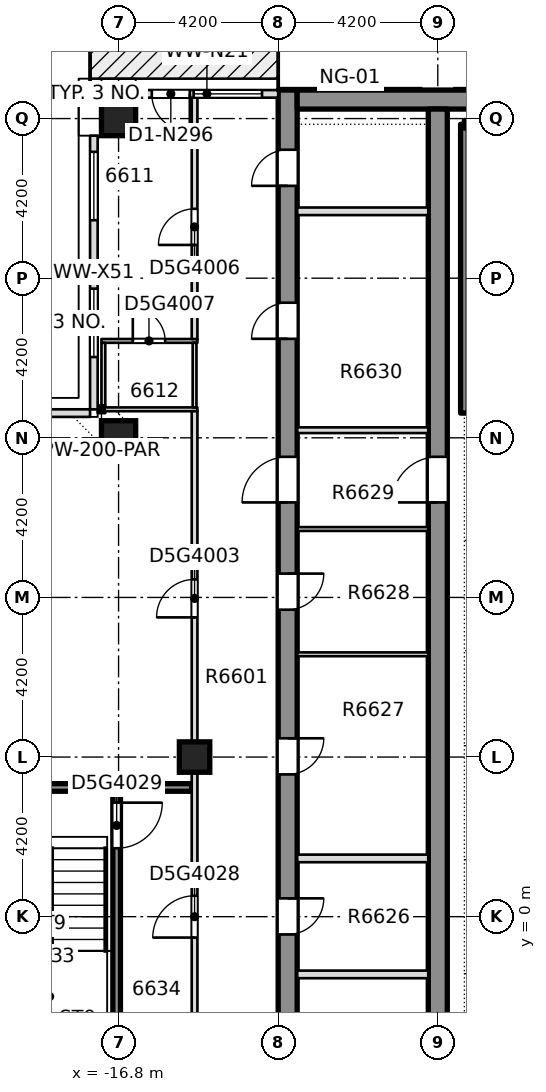
"""IFC4 building model, lengths in metres.
Left out: names, types, materials, properties, quantities, classifications, styles, units other than length and angle.
Written with IfcOpenShell. Run it as: python <this file> out.ifc"""

import sys

from ifc_helpers import new_model, si_unit, direction, frame, frame_2d, origin, origin_2d, place, context, subcontext, project, spatial, rectangle, extrude, element, fill, save


model = new_model("IFC4")
c1 = context("Model", 3, precision=1e-05, world=origin(), true_north=direction((0.0, 1.0)))
c2 = subcontext(c1, "Body", "Model", "MODEL_VIEW")
j1 = project(units=[si_unit("LENGTHUNIT", "METRE"), si_unit("PLANEANGLEUNIT", "RADIAN")], contexts=[c1])
p1 = place(None, origin())
s1 = spatial("IfcSite", under=j1, at=p1, CompositionType="ELEMENT")
p2 = place(p1, origin())
s2 = spatial("IfcBuilding", under=s1, at=p2, CompositionType="ELEMENT")
p3 = place(p2, frame((0.0, 0.0, 251.05)))
s3 = spatial("IfcBuildingStorey", under=s2, at=p3, CompositionType="ELEMENT", Elevation=251.05)
p4 = place(p3, frame((-12.35, -8.4, -0.4), z_axis=(0.0, 0.0, 1.0), x_axis=(0.0, 1.0, 0.0)))
e1 = element("IfcWall", 1, at=p4, inside=s3, PredefinedType="SHEAR", context=c2, shape_type="SweptSolid", body=[
    extrude(rectangle(XDim=30.15, YDim=0.5, at=frame_2d((15.075, 0.0))), origin(), (0.0, 0.0, 1.0), 3.45),
])
p5 = place(p4, frame((3.416, 0.0, 0.4)))
e2 = element("IfcOpeningElement", 2, at=p5, cuts=e1, PredefinedType="OPENING", context=c2, shape_type="SweptSolid", body=[
    extrude(rectangle(XDim=0.95, YDim=2.1, at=frame_2d((0.475, 1.05))), frame((0.0, 0.26, 0.0), z_axis=(0.0, -1.0, 0.0), x_axis=(1.0, 0.0, 0.0)), (0.0, 0.0, 1.0), 0.52),
])
p6 = place(p4, frame((7.932, 0.0, 0.4)))
e3 = element("IfcOpeningElement", 3, at=p6, cuts=e1, PredefinedType="OPENING", context=c2, shape_type="SweptSolid", body=[
    extrude(rectangle(XDim=0.95, YDim=2.1, at=frame_2d((0.475, 1.05))), frame((0.0, 0.26, 0.0), z_axis=(0.0, -1.0, 0.0), x_axis=(1.0, 0.0, 0.0)), (0.0, 0.0, 1.0), 0.52),
])
p7 = place(p4, frame((12.144, 0.0, 0.4)))
e4 = element("IfcOpeningElement", 4, at=p7, cuts=e1, PredefinedType="OPENING", context=c2, shape_type="SweptSolid", body=[
    extrude(rectangle(XDim=0.95, YDim=2.1, at=frame_2d((0.475, 1.05))), frame((0.0, 0.26, 0.0), z_axis=(0.0, -1.0, 0.0), x_axis=(1.0, 0.0, 0.0)), (0.0, 0.0, 1.0), 0.52),
])
p8 = place(p4, frame((16.477, 0.0, 0.4)))
e5 = element("IfcOpeningElement", 5, at=p8, cuts=e1, PredefinedType="OPENING", context=c2, shape_type="SweptSolid", body=[
    extrude(rectangle(XDim=0.95, YDim=2.1, at=frame_2d((0.475, 1.05))), frame((0.0, 0.26, 0.0), z_axis=(0.0, -1.0, 0.0), x_axis=(1.0, 0.0, 0.0)), (0.0, 0.0, 1.0), 0.52),
])
p9 = place(p4, frame((23.605, 0.0, 0.4)))
e6 = element("IfcOpeningElement", 6, at=p9, cuts=e1, PredefinedType="OPENING", context=c2, shape_type="SweptSolid", body=[
    extrude(rectangle(XDim=0.95, YDim=2.1, at=frame_2d((0.475, 1.05))), frame((0.0, 0.26, 0.0), z_axis=(0.0, -1.0, 0.0), x_axis=(1.0, 0.0, 0.0)), (0.0, 0.0, 1.0), 0.52),
])
p10 = place(p4, frame((27.63, 0.0, 0.4)))
e7 = element("IfcOpeningElement", 7, at=p10, cuts=e1, PredefinedType="OPENING", context=c2, shape_type="SweptSolid", body=[
    extrude(rectangle(XDim=0.95, YDim=2.1, at=frame_2d((0.475, 1.05))), frame((0.0, 0.26, 0.0), z_axis=(0.0, -1.0, 0.0), x_axis=(1.0, 0.0, 0.0)), (0.0, 0.0, 1.0), 0.52),
])
p11 = place(p4, frame((19.3, 0.0, 0.4)))
e8 = element("IfcOpeningElement", 8, at=p11, cuts=e1, PredefinedType="OPENING", context=c2, shape_type="SweptSolid", body=[
    extrude(rectangle(XDim=1.2, YDim=2.1, at=frame_2d((0.6, 1.05))), frame((0.0, 0.26, 0.0), z_axis=(0.0, -1.0, 0.0), x_axis=(1.0, 0.0, 0.0)), (0.0, 0.0, 1.0), 0.52),
])
p12 = place(p3, frame((-12.1, 21.5, -0.4), z_axis=(0.0, 0.0, 1.0), x_axis=(1.0, 0.0, 0.0)))
e9 = element("IfcWall", 9, at=p12, inside=s3, PredefinedType="SHEAR", context=c2, shape_type="SweptSolid", body=[
    extrude(rectangle(XDim=24.2, YDim=0.5, at=frame_2d((12.1, 0.0))), origin(), (0.0, 0.0, 1.0), 3.45),
])
p13 = place(p3, frame((-8.4, -7.9, -0.4), z_axis=(0.0, 0.0, 1.0), x_axis=(0.0, 1.0, 0.0)))
e10 = element("IfcWall", 10, at=p13, inside=s3, PredefinedType="SHEAR", context=c2, shape_type="SweptSolid", body=[
    extrude(rectangle(XDim=29.15, YDim=0.5, at=frame_2d((14.575, 0.0))), origin(), (0.0, 0.0, 1.0), 3.45),
])
p14 = place(p13, frame((18.8, 0.0, 0.4)))
e11 = element("IfcOpeningElement", 11, at=p14, cuts=e10, PredefinedType="OPENING", context=c2, shape_type="SweptSolid", body=[
    extrude(rectangle(XDim=1.2, YDim=2.1, at=frame_2d((0.6, 1.05))), frame((0.0, 0.26, 0.0), z_axis=(0.0, -1.0, 0.0), x_axis=(1.0, 0.0, 0.0)), (0.0, 0.0, 1.0), 0.52),
])
for number, where, z_axis, x_axis in (
    (12, (-16.8, 12.6, -0.4), (0.0, 0.0, 1.0), (1.0, 0.0, 0.0)),
    (13, (-16.8, 21.0, -0.4), (0.0, 0.0, 1.0), (1.0, 0.0, 0.0)),
):
    element("IfcColumn", number, at=place(p3, frame(where, z_axis=z_axis, x_axis=x_axis)), inside=s3, PredefinedType="COLUMN", context=c2, shape_type="SweptSolid", body=[
        extrude(rectangle(XDim=0.9, YDim=0.9, at=origin_2d()), origin(), (0.0, 0.0, 1.0), 3.45),
    ])
p15 = place(p3, frame((-14.8, 4.2, -0.4), z_axis=(0.0, 0.0, 1.0), x_axis=(1.0, 0.0, 0.0)))
e14 = element("IfcColumn", 14, at=p15, inside=s3, PredefinedType="COLUMN", context=c2, shape_type="SweptSolid", body=[
    extrude(rectangle(XDim=0.8, YDim=0.8, at=origin_2d()), origin(), (0.0, 0.0, 1.0), 3.45),
])
p16 = place(p3, frame((-20.45, 3.4, 0.0), z_axis=(0.0, 0.0, 1.0), x_axis=(1.0, 0.0, 0.0)))
e15 = element("IfcWall", 15, at=p16, inside=s3, PredefinedType="SOLIDWALL", context=c2, shape_type="SweptSolid", body=[
    extrude(rectangle(XDim=5.575, YDim=0.2, at=frame_2d((2.788, 0.0))), origin(), (0.0, 0.0, 1.0), 3.05),
])
p17 = place(p3, frame((-17.35, 13.35, 0.0), z_axis=(0.0, 0.0, 1.0), x_axis=(1.0, 0.0, 0.0)))
e16 = element("IfcWall", 16, at=p17, inside=s3, PredefinedType="PARTITIONING", context=c2, shape_type="SweptSolid", body=[
    extrude(rectangle(XDim=0.2, YDim=0.2, at=frame_2d((0.1, 0.0))), origin(), (0.0, 0.0, 1.0), 3.05),
])
p18 = place(p3, frame((-17.25, 13.35, 0.0), z_axis=(0.0, 0.0, 1.0), x_axis=(1.0, 0.0, 0.0)))
e17 = element("IfcWall", 17, at=p18, inside=s3, PredefinedType="PARTITIONING", context=c2, shape_type="SweptSolid", body=[
    extrude(rectangle(XDim=2.525, YDim=0.1, at=frame_2d((1.262, 0.0))), origin(), (0.0, 0.0, 1.0), 3.05),
])
p19 = place(p3, frame((-17.25, 15.15, 0.0), z_axis=(0.0, 0.0, 1.0), x_axis=(1.0, 0.0, 0.0)))
e18 = element("IfcWall", 18, at=p19, inside=s3, PredefinedType="PARTITIONING", context=c2, shape_type="SweptSolid", body=[
    extrude(rectangle(XDim=2.525, YDim=0.1, at=frame_2d((1.262, 0.0))), origin(), (0.0, 0.0, 1.0), 3.05),
])
p20 = place(p19, frame((0.825, 0.0, 0.0)))
e19 = element("IfcOpeningElement", 19, at=p20, cuts=e18, PredefinedType="OPENING", context=c2, shape_type="SweptSolid", body=[
    extrude(rectangle(XDim=0.85, YDim=2.1, at=frame_2d((0.425, 1.05))), frame((0.0, 0.06, 0.0), z_axis=(0.0, -1.0, 0.0), x_axis=(1.0, 0.0, 0.0)), (0.0, 0.0, 1.0), 0.12),
])
p21 = place(p3, frame((-17.2, 13.45, 0.0), z_axis=(0.0, 0.0, 1.0), x_axis=(0.0, 1.0, 0.0)))
e20 = element("IfcWall", 20, at=p21, inside=s3, PredefinedType="PARTITIONING", context=c2, shape_type="SweptSolid", body=[
    extrude(rectangle(XDim=1.65, YDim=0.1, at=frame_2d((0.825, 0.0))), origin(), (0.0, 0.0, 1.0), 3.05),
])
p22 = place(p3, frame((-16.85, -3.3, 0.0), z_axis=(0.0, 0.0, 1.0), x_axis=(0.0, 1.0, 0.0)))
e21 = element("IfcWall", 21, at=p22, inside=s3, PredefinedType="SOLIDWALL", context=c2, shape_type="SweptSolid", body=[
    extrude(rectangle(XDim=6.6, YDim=0.2, at=frame_2d((3.3, 0.0))), origin(), (0.0, 0.0, 1.0), 3.05),
])
p23 = place(p22, frame((5.1, 0.0, 0.0)))
e22 = element("IfcOpeningElement", 22, at=p23, cuts=e21, PredefinedType="OPENING", context=c2, shape_type="SweptSolid", body=[
    extrude(rectangle(XDim=1.2, YDim=2.1, at=frame_2d((0.6, 1.05))), frame((0.0, 0.11, 0.0), z_axis=(0.0, -1.0, 0.0), x_axis=(1.0, 0.0, 0.0)), (0.0, 0.0, 1.0), 0.22),
])
p24 = place(p3, frame((-14.8, -5.223, 0.0), z_axis=(0.0, 0.0, 1.0), x_axis=(0.0, 1.0, 0.0)))
e23 = element("IfcWall", 23, at=p24, inside=s3, PredefinedType="PARTITIONING", context=c2, shape_type="SweptSolid", body=[
    extrude(rectangle(XDim=18.523, YDim=0.15, at=frame_2d((9.261, 0.0))), origin(), (0.0, 0.0, 1.0), 3.05),
])
p25 = place(p24, frame((13.098, 0.0, 0.0)))
e24 = element("IfcOpeningElement", 24, at=p25, cuts=e23, PredefinedType="OPENING", context=c2, shape_type="SweptSolid", body=[
    extrude(rectangle(XDim=1.0, YDim=2.1, at=frame_2d((0.5, 1.05))), frame((0.0, 0.085, 0.0), z_axis=(0.0, -1.0, 0.0), x_axis=(1.0, 0.0, 0.0)), (0.0, 0.0, 1.0), 0.17),
])
p26 = place(p24, frame((4.673, 0.0, 0.0)))
e25 = element("IfcOpeningElement", 25, at=p26, cuts=e23, PredefinedType="OPENING", context=c2, shape_type="SweptSolid", body=[
    extrude(rectangle(XDim=1.1, YDim=2.1, at=frame_2d((0.55, 1.05))), frame((0.0, 0.085, 0.0), z_axis=(0.0, -1.0, 0.0), x_axis=(1.0, 0.0, 0.0)), (0.0, 0.0, 1.0), 0.17),
])
p27 = place(p3, frame((-14.8, 13.4, 0.0), z_axis=(0.0, 0.0, 1.0), x_axis=(0.0, 1.0, 0.0)))
e26 = element("IfcWall", 26, at=p27, inside=s3, PredefinedType="PARTITIONING", context=c2, shape_type="SweptSolid", body=[
    extrude(rectangle(XDim=1.7, YDim=0.1, at=frame_2d((0.85, 0.0))), origin(), (0.0, 0.0, 1.0), 3.05),
])
p28 = place(p3, frame((-14.8, 15.2, 0.0), z_axis=(0.0, 0.0, 1.0), x_axis=(0.0, 1.0, 0.0)))
e27 = element("IfcWall", 27, at=p28, inside=s3, PredefinedType="PARTITIONING", context=c2, shape_type="SweptSolid", body=[
    extrude(rectangle(XDim=6.35, YDim=0.15, at=frame_2d((3.175, 0.0))), origin(), (0.0, 0.0, 1.0), 3.05),
])
p29 = place(p28, frame((2.475, 0.0, 0.0)))
e28 = element("IfcOpeningElement", 28, at=p29, cuts=e27, PredefinedType="OPENING", context=c2, shape_type="SweptSolid", body=[
    extrude(rectangle(XDim=0.95, YDim=2.1, at=frame_2d((0.475, 1.05))), frame((0.0, 0.085, 0.0), z_axis=(0.0, -1.0, 0.0), x_axis=(1.0, 0.0, 0.0)), (0.0, 0.0, 1.0), 0.17),
])
p30 = place(p3, frame((-12.6, 21.65, 0.0), z_axis=(0.0, 0.0, 1.0), x_axis=(-1.0, 0.0, 0.0)))
e29 = element("IfcWall", 29, at=p30, inside=s3, PredefinedType="STANDARD", context=c2, shape_type="SweptSolid", body=[
    extrude(rectangle(XDim=3.75, YDim=0.2, at=frame_2d((1.875, 0.0))), origin(), (0.0, 0.0, 1.0), 3.05),
])
p31 = place(p30, frame((0.425, 0.0, 0.2)))
e30 = element("IfcOpeningElement", 30, at=p31, cuts=e29, PredefinedType="OPENING", context=c2, shape_type="SweptSolid", body=[
    extrude(rectangle(XDim=1.8, YDim=2.65, at=frame_2d((0.9, 1.325))), frame((0.0, 0.11, 0.0), z_axis=(0.0, -1.0, 0.0), x_axis=(1.0, 0.0, 0.0)), (0.0, 0.0, 1.0), 0.22),
])
p32 = place(p30, frame((2.325, 0.0, 0.0)))
e31 = element("IfcOpeningElement", 31, at=p32, cuts=e29, PredefinedType="OPENING", context=c2, shape_type="SweptSolid", body=[
    extrude(rectangle(XDim=1.0, YDim=2.4, at=frame_2d((0.5, 1.2))), frame((0.0, 0.11, 0.0), z_axis=(0.0, -1.0, 0.0), x_axis=(1.0, 0.0, 0.0)), (0.0, 0.0, 1.0), 0.22),
])
p33 = place(p3, frame((-17.45, 20.55, 0.0), z_axis=(0.0, 0.0, 1.0), x_axis=(0.0, -1.0, 0.0)))
e32 = element("IfcWall", 32, at=p33, inside=s3, PredefinedType="STANDARD", context=c2, shape_type="SweptSolid", body=[
    extrude(rectangle(XDim=7.2, YDim=0.2, at=frame_2d((3.6, 0.0))), origin(), (0.0, 0.0, 1.0), 3.05),
])
p34 = place(p33, frame((4.025, 0.0, 0.2)))
e33 = element("IfcOpeningElement", 33, at=p34, cuts=e32, PredefinedType="OPENING", context=c2, shape_type="SweptSolid", body=[
    extrude(rectangle(XDim=1.8, YDim=2.65, at=frame_2d((0.9, 1.325))), frame((0.0, 0.11, 0.0), z_axis=(0.0, -1.0, 0.0), x_axis=(1.0, 0.0, 0.0)), (0.0, 0.0, 1.0), 0.22),
])
p35 = place(p33, frame((0.425, 0.0, 0.2)))
e34 = element("IfcOpeningElement", 34, at=p35, cuts=e32, PredefinedType="OPENING", context=c2, shape_type="SweptSolid", body=[
    extrude(rectangle(XDim=1.8, YDim=2.65, at=frame_2d((0.9, 1.325))), frame((0.0, 0.11, 0.0), z_axis=(0.0, -1.0, 0.0), x_axis=(1.0, 0.0, 0.0)), (0.0, 0.0, 1.0), 0.22),
])
p36 = place(p3, frame((-17.55, 13.25, 0.0), z_axis=(0.0, 0.0, 1.0), x_axis=(-1.0, 0.0, 0.0)))
e35 = element("IfcWall", 35, at=p36, inside=s3, PredefinedType="STANDARD", context=c2, shape_type="SweptSolid", body=[
    extrude(rectangle(XDim=7.2, YDim=0.2, at=frame_2d((3.6, 0.0))), origin(), (0.0, 0.0, 1.0), 3.05),
])
for number, where, z_axis, x_axis in (
    (36, (-12.099, -1.519, 0.0), (0.0, 0.0, 1.0), (1.0, 0.0, 0.0)),
    (37, (-12.099, 1.533, 0.0), (0.0, 0.0, 1.0), (1.0, 0.0, 0.0)),
):
    element("IfcWall", number, at=place(p3, frame(where, z_axis=z_axis, x_axis=x_axis)), inside=s3, PredefinedType="PARTITIONING", context=c2, shape_type="SweptSolid", body=[
        extrude(rectangle(XDim=3.448, YDim=0.2, at=frame_2d((1.724, 0.0))), origin(), (0.0, 0.0, 1.0), 3.05),
    ])
for number, where, z_axis, x_axis in (
    (38, (-12.099, 6.904, 0.0), (0.0, 0.0, 1.0), (1.0, 0.0, 0.0)),
    (39, (-12.099, 10.2, 0.0), (0.0, 0.0, 1.0), (1.0, 0.0, 0.0)),
):
    element("IfcWall", number, at=place(p3, frame(where, z_axis=z_axis, x_axis=x_axis)), inside=s3, PredefinedType="PARTITIONING", context=c2, shape_type="SweptSolid", body=[
        extrude(rectangle(XDim=3.448, YDim=0.1, at=frame_2d((1.724, 0.0))), origin(), (0.0, 0.0, 1.0), 3.05),
    ])
p37 = place(p3, frame((-12.099, 12.8, 0.0), z_axis=(0.0, 0.0, 1.0), x_axis=(1.0, 0.0, 0.0)))
e40 = element("IfcWall", 40, at=p37, inside=s3, PredefinedType="PARTITIONING", context=c2, shape_type="SweptSolid", body=[
    extrude(rectangle(XDim=3.448, YDim=0.15, at=frame_2d((1.724, 0.0))), origin(), (0.0, 0.0, 1.0), 3.05),
])
p38 = place(p3, frame((-12.099, 18.56, 0.0), z_axis=(0.0, 0.0, 1.0), x_axis=(1.0, 0.0, 0.0)))
e41 = element("IfcWall", 41, at=p38, inside=s3, PredefinedType="PARTITIONING", context=c2, shape_type="SweptSolid", body=[
    extrude(rectangle(XDim=3.448, YDim=0.2, at=frame_2d((1.724, 0.0))), origin(), (0.0, 0.0, 1.0), 3.05),
])
p39 = place(p3, frame((-7.7, 13.25, 0.0), z_axis=(0.0, 0.0, 1.0), x_axis=(0.0, 1.0, 0.0)))
e42 = element("IfcWall", 42, at=p39, inside=s3, PredefinedType="SOLIDWALL", context=c2, shape_type="SweptSolid", body=[
    extrude(rectangle(XDim=7.6, YDim=0.2, at=frame_2d((3.8, 0.0))), origin(), (0.0, 0.0, 1.0), 3.05),
])
p40 = place(p3, frame((-7.7, 20.85, 0.0), z_axis=(0.0, 0.0, 1.0), x_axis=(1.0, 0.0, 0.0)))
e43 = element("IfcWall", 43, at=p40, inside=s3, PredefinedType="SOLIDWALL", context=c2, shape_type="SweptSolid", body=[
    extrude(rectangle(XDim=3.55, YDim=0.2, at=frame_2d((1.775, 0.0))), origin(), (0.0, 0.0, 1.0), 3.05),
])
p41 = place(p25, origin())
e44 = element("IfcDoor", 44, at=p41, inside=s3, OperationType="SINGLE_SWING_LEFT", PredefinedType="DOOR", context=c2, shape_type="SweptSolid", body=[
    extrude(rectangle(XDim=1.0, YDim=2.1, at=frame_2d((0.5, 1.05))), frame((0.0, 0.025, 0.0), z_axis=(0.0, -1.0, 0.0), x_axis=(1.0, 0.0, 0.0)), (0.0, 0.0, 1.0), 0.05),
])
fill(e24, e44)
p42 = place(p29, origin())
e45 = element("IfcDoor", 45, at=p42, inside=s3, OperationType="SINGLE_SWING_RIGHT", PredefinedType="DOOR", context=c2, shape_type="SweptSolid", body=[
    extrude(rectangle(XDim=0.95, YDim=2.1, at=frame_2d((0.475, 1.05))), frame((0.0, 0.025, 0.0), z_axis=(0.0, -1.0, 0.0), x_axis=(1.0, 0.0, 0.0)), (0.0, 0.0, 1.0), 0.05),
])
fill(e28, e45)
p43 = place(p20, origin())
e46 = element("IfcDoor", 46, at=p43, inside=s3, OperationType="SINGLE_SWING_RIGHT", PredefinedType="DOOR", context=c2, shape_type="SweptSolid", body=[
    extrude(rectangle(XDim=0.85, YDim=2.1, at=frame_2d((0.425, 1.05))), frame((0.0, 0.025, 0.0), z_axis=(0.0, -1.0, 0.0), x_axis=(1.0, 0.0, 0.0)), (0.0, 0.0, 1.0), 0.05),
])
fill(e19, e46)
p44 = place(p26, origin())
e47 = element("IfcDoor", 47, at=p44, inside=s3, OperationType="SINGLE_SWING_LEFT", PredefinedType="DOOR", context=c2, shape_type="SweptSolid", body=[
    extrude(rectangle(XDim=1.1, YDim=2.1, at=frame_2d((0.55, 1.05))), frame((0.0, 0.025, 0.0), z_axis=(0.0, -1.0, 0.0), x_axis=(1.0, 0.0, 0.0)), (0.0, 0.0, 1.0), 0.05),
])
fill(e25, e47)
p45 = place(p23, origin())
e48 = element("IfcDoor", 48, at=p45, inside=s3, OperationType="SINGLE_SWING_RIGHT", PredefinedType="DOOR", context=c2, shape_type="SweptSolid", body=[
    extrude(rectangle(XDim=1.2, YDim=2.1, at=frame_2d((0.6, 1.05))), frame((0.0, 0.025, 0.0), z_axis=(0.0, -1.0, 0.0), x_axis=(1.0, 0.0, 0.0)), (0.0, 0.0, 1.0), 0.05),
])
fill(e22, e48)
p46 = place(p31, origin())
e49 = element("IfcWindow", 49, at=p46, inside=s3, PartitioningType="SINGLE_PANEL", PredefinedType="WINDOW", context=c2, shape_type="SweptSolid", body=[
    extrude(rectangle(XDim=1.8, YDim=2.65, at=frame_2d((0.9, 1.325))), frame((0.0, 0.03, 0.0), z_axis=(0.0, -1.0, 0.0), x_axis=(1.0, 0.0, 0.0)), (0.0, 0.0, 1.0), 0.06),
])
fill(e30, e49)
p47 = place(p32, origin())
e50 = element("IfcDoor", 50, at=p47, inside=s3, OperationType="SINGLE_SWING_LEFT", PredefinedType="DOOR", context=c2, shape_type="SweptSolid", body=[
    extrude(rectangle(XDim=1.0, YDim=2.4, at=frame_2d((0.5, 1.2))), frame((0.0, 0.025, 0.0), z_axis=(0.0, -1.0, 0.0), x_axis=(1.0, 0.0, 0.0)), (0.0, 0.0, 1.0), 0.05),
])
fill(e31, e50)
p48 = place(p34, origin())
e51 = element("IfcWindow", 51, at=p48, inside=s3, PartitioningType="SINGLE_PANEL", PredefinedType="WINDOW", context=c2, shape_type="SweptSolid", body=[
    extrude(rectangle(XDim=1.8, YDim=2.65, at=frame_2d((0.9, 1.325))), frame((0.0, 0.03, 0.0), z_axis=(0.0, -1.0, 0.0), x_axis=(1.0, 0.0, 0.0)), (0.0, 0.0, 1.0), 0.06),
])
fill(e33, e51)
p49 = place(p35, origin())
e52 = element("IfcWindow", 52, at=p49, inside=s3, PartitioningType="SINGLE_PANEL", PredefinedType="WINDOW", context=c2, shape_type="SweptSolid", body=[
    extrude(rectangle(XDim=1.8, YDim=2.65, at=frame_2d((0.9, 1.325))), frame((0.0, 0.03, 0.0), z_axis=(0.0, -1.0, 0.0), x_axis=(1.0, 0.0, 0.0)), (0.0, 0.0, 1.0), 0.06),
])
fill(e34, e52)
p50 = place(p6, origin())
e53 = element("IfcDoor", 53, at=p50, inside=s3, OperationType="SINGLE_SWING_LEFT", PredefinedType="DOOR", context=c2, shape_type="SweptSolid", body=[
    extrude(rectangle(XDim=0.95, YDim=2.1, at=frame_2d((0.475, 1.05))), frame((0.0, 0.025, 0.0), z_axis=(0.0, -1.0, 0.0), x_axis=(1.0, 0.0, 0.0)), (0.0, 0.0, 1.0), 0.05),
])
fill(e3, e53)
p51 = place(p7, origin())
e54 = element("IfcDoor", 54, at=p51, inside=s3, OperationType="SINGLE_SWING_LEFT", PredefinedType="DOOR", context=c2, shape_type="SweptSolid", body=[
    extrude(rectangle(XDim=0.95, YDim=2.1, at=frame_2d((0.475, 1.05))), frame((0.0, 0.025, 0.0), z_axis=(0.0, -1.0, 0.0), x_axis=(1.0, 0.0, 0.0)), (0.0, 0.0, 1.0), 0.05),
])
fill(e4, e54)
p52 = place(p8, origin())
e55 = element("IfcDoor", 55, at=p52, inside=s3, OperationType="SINGLE_SWING_LEFT", PredefinedType="DOOR", context=c2, shape_type="SweptSolid", body=[
    extrude(rectangle(XDim=0.95, YDim=2.1, at=frame_2d((0.475, 1.05))), frame((0.0, 0.025, 0.0), z_axis=(0.0, -1.0, 0.0), x_axis=(1.0, 0.0, 0.0)), (0.0, 0.0, 1.0), 0.05),
])
fill(e5, e55)
p53 = place(p9, origin())
e56 = element("IfcDoor", 56, at=p53, inside=s3, OperationType="SINGLE_SWING_LEFT", PredefinedType="DOOR", context=c2, shape_type="SweptSolid", body=[
    extrude(rectangle(XDim=0.95, YDim=2.1, at=frame_2d((0.475, 1.05))), frame((0.0, 0.025, 0.0), z_axis=(0.0, -1.0, 0.0), x_axis=(1.0, 0.0, 0.0)), (0.0, 0.0, 1.0), 0.05),
])
fill(e6, e56)
p54 = place(p10, origin())
e57 = element("IfcDoor", 57, at=p54, inside=s3, OperationType="SINGLE_SWING_LEFT", PredefinedType="DOOR", context=c2, shape_type="SweptSolid", body=[
    extrude(rectangle(XDim=0.95, YDim=2.1, at=frame_2d((0.475, 1.05))), frame((0.0, 0.025, 0.0), z_axis=(0.0, -1.0, 0.0), x_axis=(1.0, 0.0, 0.0)), (0.0, 0.0, 1.0), 0.05),
])
fill(e7, e57)
p55 = place(p11, origin())
e58 = element("IfcDoor", 58, at=p55, inside=s3, OperationType="SINGLE_SWING_LEFT", PredefinedType="DOOR", context=c2, shape_type="SweptSolid", body=[
    extrude(rectangle(XDim=1.2, YDim=2.1, at=frame_2d((0.6, 1.05))), frame((0.0, 0.025, 0.0), z_axis=(0.0, -1.0, 0.0), x_axis=(1.0, 0.0, 0.0)), (0.0, 0.0, 1.0), 0.05),
])
fill(e8, e58)
p56 = place(p14, origin())
e59 = element("IfcDoor", 59, at=p56, inside=s3, OperationType="SINGLE_SWING_LEFT", PredefinedType="DOOR", context=c2, shape_type="SweptSolid", body=[
    extrude(rectangle(XDim=1.2, YDim=2.1, at=frame_2d((0.6, 1.05))), frame((0.0, 0.025, 0.0), z_axis=(0.0, -1.0, 0.0), x_axis=(1.0, 0.0, 0.0)), (0.0, 0.0, 1.0), 0.05),
])
fill(e11, e59)
save(model, sys.argv[1])
